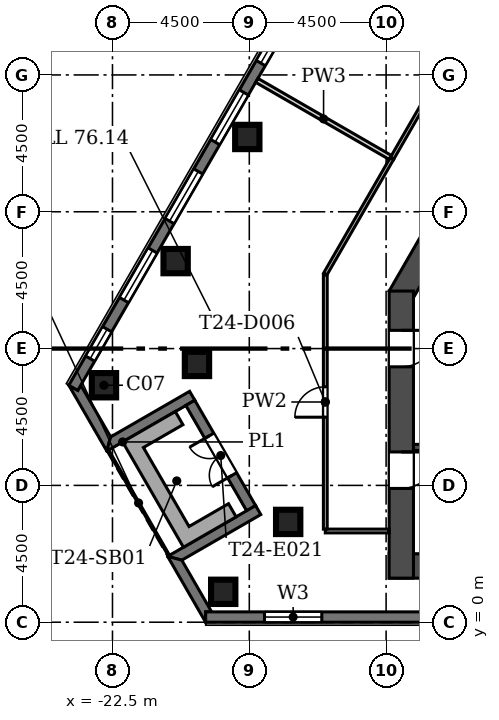
"""IFC4 building model, lengths in metres.
Left out: names, types, materials, properties, quantities, classifications, styles, units other than length and angle.
Written with IfcOpenShell. Run it as: python <this file> out.ifc"""

import sys

from ifc_helpers import new_model, si_unit, direction, frame, frame_2d, origin, origin_2d, place, context, subcontext, project, spatial, polyline, rectangle, outline, extrude, element, fill, save


model = new_model("IFC4")
c1 = context("Model", 3, precision=1e-05, world=origin(), true_north=direction((0.0, 1.0)))
c2 = subcontext(c1, "Body", "Model", "MODEL_VIEW")
j1 = project(units=[si_unit("LENGTHUNIT", "METRE"), si_unit("PLANEANGLEUNIT", "RADIAN")], contexts=[c1])
p1 = place(None, origin())
s1 = spatial("IfcSite", under=j1, at=p1, CompositionType="ELEMENT")
p2 = place(p1, origin())
s2 = spatial("IfcBuilding", under=s1, at=p2, CompositionType="ELEMENT")
p3 = place(p2, frame((0.0, 0.0, 335.1)))
s3 = spatial("IfcBuildingStorey", under=s2, at=p3, CompositionType="ELEMENT", Elevation=335.1)
for number, where, z_axis, x_axis in (
    (1, (-22.78, 7.794, 0.0), (0.0, 0.0, 1.0), (1.0, 0.0, 0.0)),
    (2, (-19.721, 8.495, 0.0), (0.0, 0.0, 1.0), (1.0, 0.0, 0.0)),
    (3, (-16.721, 3.299, 0.0), (0.0, 0.0, 1.0), (1.0, 0.0, 0.0)),
    (4, (-18.858, 1.0, 0.0), (0.0, 0.0, 1.0), (1.0, 0.0, 0.0)),
    (5, (-18.066, 15.96, 0.0), (0.0, 0.0, 1.0), (1.0, 0.0, 0.0)),
    (6, (-20.423, 11.877, 0.0), (0.0, 0.0, 1.0), (1.0, 0.0, 0.0)),
):
    element("IfcColumn", number, at=place(p3, frame(where, z_axis=z_axis, x_axis=x_axis)), inside=s3, PredefinedType="COLUMN", context=c2, shape_type="SweptSolid", body=[
        extrude(rectangle(XDim=0.8, YDim=0.8, at=origin_2d()), origin(), (0.0, 0.0, 1.0), 4.2),
    ])
p4 = place(p3, frame((-13.4, 1.85, 0.0), z_axis=(0.0, 0.0, 1.0), x_axis=(1.0, 0.0, 0.0)))
e7 = element("IfcWall", 7, at=p4, inside=s3, PredefinedType="SHEAR", context=c2, shape_type="SweptSolid", body=[
    extrude(rectangle(XDim=26.8, YDim=0.8, at=frame_2d((13.4, 0.0))), origin(), (0.0, 0.0, 1.0), 4.2),
])
p5 = place(p3, frame((-8.719, 18.2, 0.0), z_axis=(0.0, 0.0, 1.0), x_axis=(-0.500015780397, -0.866016292776, 0.0)))
e8 = element("IfcWall", 8, at=p5, inside=s3, PredefinedType="SHEAR", context=c2, shape_type="SweptSolid", body=[
    extrude(rectangle(XDim=8.67, YDim=0.8, at=frame_2d((4.335, 0.0))), origin(), (0.0, 0.0, 1.0), 4.2),
])
p6 = place(p3, frame((-13.0, 10.892, 0.0), z_axis=(0.0, 0.0, 1.0), x_axis=(0.0, -1.0, 0.0)))
e9 = element("IfcWall", 9, at=p6, inside=s3, PredefinedType="SHEAR", context=c2, shape_type="SweptSolid", body=[
    extrude(rectangle(XDim=9.442, YDim=0.8, at=frame_2d((4.721, 0.0))), origin(), (0.0, 0.0, 1.0), 4.2),
])
p7 = place(p6, frame((5.292, 0.0, 0.0)))
e10 = element("IfcOpeningElement", 10, at=p7, cuts=e9, PredefinedType="OPENING", context=c2, shape_type="SweptSolid", body=[
    extrude(rectangle(XDim=1.2, YDim=2.1, at=frame_2d((0.6, 1.05))), frame((0.0, 0.41, 0.0), z_axis=(0.0, -1.0, 0.0), x_axis=(1.0, 0.0, 0.0)), (0.0, 0.0, 1.0), 0.82),
])
p8 = place(p6, frame((1.292, 0.0, 0.0)))
e11 = element("IfcOpeningElement", 11, at=p8, cuts=e9, PredefinedType="OPENING", context=c2, shape_type="SweptSolid", body=[
    extrude(rectangle(XDim=1.2, YDim=2.1, at=frame_2d((0.6, 1.05))), frame((0.0, 0.41, 0.0), z_axis=(0.0, -1.0, 0.0), x_axis=(1.0, 0.0, 0.0)), (0.0, 0.0, 1.0), 0.82),
])
p9 = place(p3, origin())
e12 = element("IfcWall", 12, at=p9, inside=s3, PredefinedType="SOLIDWALL", context=c2, shape_type="SweptSolid", body=[
    extrude(outline(polyline([(-22.685, 5.628), (-23.936, 7.795), (-23.936, 7.795), (-23.641, 7.625), (-23.542, 7.795), (-22.56, 6.094), (-22.685, 5.628), (-22.685, 5.628)])), origin(), (0.0, 0.0, 1.0), 3.8),
])
p10 = place(p3, origin())
e13 = element("IfcWall", 13, at=p10, inside=s3, PredefinedType="SOLIDWALL", context=c2, shape_type="SweptSolid", body=[
    extrude(outline(polyline([(-19.962, 7.594), (-19.792, 7.299), (-20.087, 7.129), (-22.686, 5.628), (-22.686, 5.628), (-22.561, 6.094), (-19.962, 7.594)])), origin(), (0.0, 0.0, 1.0), 3.8),
])
p11 = place(p3, frame((-19.94, 7.214, 0.0), z_axis=(0.0, 0.0, 1.0), x_axis=(0.49999894854, -0.866026010844, 0.0)))
e14 = element("IfcWall", 14, at=p11, inside=s3, PredefinedType="SOLIDWALL", context=c2, shape_type="SweptSolid", body=[
    extrude(rectangle(XDim=4.0, YDim=0.34, at=frame_2d((2.0, 0.0))), origin(), (0.0, 0.0, 1.0), 3.8),
])
p12 = place(p11, frame((1.25, 0.0, 0.0)))
e15 = element("IfcOpeningElement", 15, at=p12, cuts=e14, PredefinedType="OPENING", context=c2, shape_type="SweptSolid", body=[
    extrude(rectangle(XDim=1.5, YDim=2.4, at=frame_2d((0.75, 1.2))), frame((0.0, 0.18, 0.0), z_axis=(0.0, -1.0, 0.0), x_axis=(1.0, 0.0, 0.0)), (0.0, 0.0, 1.0), 0.36),
])
p13 = place(p3, origin())
e16 = element("IfcWall", 16, at=p13, inside=s3, PredefinedType="SOLIDWALL", context=c2, shape_type="SweptSolid", body=[
    extrude(outline(polyline([(-20.686, 2.165), (-18.087, 3.666), (-17.792, 3.836), (-17.622, 3.54), (-20.22, 2.04), (-20.686, 2.165), (-20.686, 2.165)])), origin(), (0.0, 0.0, 1.0), 3.8),
])
p14 = place(p3, origin())
e17 = element("IfcWall", 17, at=p14, inside=s3, PredefinedType="SOLIDWALL", context=c2, shape_type="SweptSolid", body=[
    extrude(outline(polyline([(-19.238, 0.339), (-19.434, 0.339), (-19.434, -0.001), (-19.435, -0.001), (-20.686, 2.166), (-20.686, 2.166), (-20.22, 2.041), (-19.238, 0.339)])), origin(), (0.0, 0.0, 1.0), 3.8),
])
p15 = place(p3, frame((-19.435, 0.17, 0.0), z_axis=(0.0, 0.0, 1.0), x_axis=(1.0, 0.0, 0.0)))
e18 = element("IfcWall", 18, at=p15, inside=s3, PredefinedType="SOLIDWALL", context=c2, shape_type="SweptSolid", body=[
    extrude(rectangle(XDim=38.87, YDim=0.34, at=frame_2d((19.435, 0.0))), origin(), (0.0, 0.0, 1.0), 3.8),
])
p16 = place(p15, frame((1.935, 0.0, 0.9)))
e19 = element("IfcOpeningElement", 19, at=p16, cuts=e18, PredefinedType="OPENING", context=c2, shape_type="SweptSolid", body=[
    extrude(rectangle(XDim=1.885, YDim=2.6, at=frame_2d((0.942, 1.3))), frame((0.0, 0.18, 0.0), z_axis=(0.0, -1.0, 0.0), x_axis=(1.0, 0.0, 0.0)), (0.0, 0.0, 1.0), 0.36),
])
p17 = place(p15, frame((34.935, 0.0, 0.9)))
e20 = element("IfcOpeningElement", 20, at=p17, cuts=e18, PredefinedType="OPENING", context=c2, shape_type="SweptSolid", body=[
    extrude(rectangle(XDim=1.885, YDim=2.6, at=frame_2d((0.942, 1.3))), frame((0.0, 0.18, 0.0), z_axis=(0.0, -1.0, 0.0), x_axis=(1.0, 0.0, 0.0)), (0.0, 0.0, 1.0), 0.36),
])
p18 = place(p15, frame((11.735, 0.0, 0.6)))
e21 = element("IfcOpeningElement", 21, at=p18, cuts=e18, PredefinedType="OPENING", context=c2, shape_type="SweptSolid", body=[
    extrude(rectangle(XDim=0.6, YDim=3.0, at=frame_2d((0.3, 1.5))), frame((0.0, 0.18, 0.0), z_axis=(0.0, -1.0, 0.0), x_axis=(1.0, 0.0, 0.0)), (0.0, 0.0, 1.0), 0.36),
])
p19 = place(p15, frame((26.535, 0.0, 0.6)))
e22 = element("IfcOpeningElement", 22, at=p19, cuts=e18, PredefinedType="OPENING", context=c2, shape_type="SweptSolid", body=[
    extrude(rectangle(XDim=0.6, YDim=3.0, at=frame_2d((0.3, 1.5))), frame((0.0, 0.18, 0.0), z_axis=(0.0, -1.0, 0.0), x_axis=(1.0, 0.0, 0.0)), (0.0, 0.0, 1.0), 0.36),
])
p20 = place(p3, frame((-4.353, 41.372, 0.0), z_axis=(0.0, 0.0, 1.0), x_axis=(-0.500001731347, -0.866024404189, 0.0)))
e23 = element("IfcWall", 23, at=p20, inside=s3, PredefinedType="SOLIDWALL", context=c2, shape_type="SweptSolid", body=[
    extrude(rectangle(XDim=38.87, YDim=0.34, at=frame_2d((19.435, 0.0))), origin(), (0.0, 0.0, 1.0), 3.8),
])
p21 = place(p20, frame((3.653, 0.0, 0.9)))
e24 = element("IfcOpeningElement", 24, at=p21, cuts=e23, PredefinedType="OPENING", context=c2, shape_type="SweptSolid", body=[
    extrude(rectangle(XDim=1.885, YDim=2.6, at=frame_2d((0.942, 1.3))), frame((0.0, 0.18, 0.0), z_axis=(0.0, -1.0, 0.0), x_axis=(1.0, 0.0, 0.0)), (0.0, 0.0, 1.0), 0.36),
])
p22 = place(p20, frame((6.653, 0.0, 0.9)))
e25 = element("IfcOpeningElement", 25, at=p22, cuts=e23, PredefinedType="OPENING", context=c2, shape_type="SweptSolid", body=[
    extrude(rectangle(XDim=1.885, YDim=2.6, at=frame_2d((0.942, 1.3))), frame((0.0, 0.18, 0.0), z_axis=(0.0, -1.0, 0.0), x_axis=(1.0, 0.0, 0.0)), (0.0, 0.0, 1.0), 0.36),
])
p23 = place(p20, frame((9.653, 0.0, 0.9)))
e26 = element("IfcOpeningElement", 26, at=p23, cuts=e23, PredefinedType="OPENING", context=c2, shape_type="SweptSolid", body=[
    extrude(rectangle(XDim=1.885, YDim=2.6, at=frame_2d((0.942, 1.3))), frame((0.0, 0.18, 0.0), z_axis=(0.0, -1.0, 0.0), x_axis=(1.0, 0.0, 0.0)), (0.0, 0.0, 1.0), 0.36),
])
p24 = place(p20, frame((12.653, 0.0, 0.9)))
e27 = element("IfcOpeningElement", 27, at=p24, cuts=e23, PredefinedType="OPENING", context=c2, shape_type="SweptSolid", body=[
    extrude(rectangle(XDim=1.885, YDim=2.6, at=frame_2d((0.942, 1.3))), frame((0.0, 0.18, 0.0), z_axis=(0.0, -1.0, 0.0), x_axis=(1.0, 0.0, 0.0)), (0.0, 0.0, 1.0), 0.36),
])
p25 = place(p20, frame((15.653, 0.0, 0.9)))
e28 = element("IfcOpeningElement", 28, at=p25, cuts=e23, PredefinedType="OPENING", context=c2, shape_type="SweptSolid", body=[
    extrude(rectangle(XDim=1.885, YDim=2.6, at=frame_2d((0.942, 1.3))), frame((0.0, 0.18, 0.0), z_axis=(0.0, -1.0, 0.0), x_axis=(1.0, 0.0, 0.0)), (0.0, 0.0, 1.0), 0.36),
])
p26 = place(p20, frame((18.653, 0.0, 0.9)))
e29 = element("IfcOpeningElement", 29, at=p26, cuts=e23, PredefinedType="OPENING", context=c2, shape_type="SweptSolid", body=[
    extrude(rectangle(XDim=1.885, YDim=2.6, at=frame_2d((0.942, 1.3))), frame((0.0, 0.18, 0.0), z_axis=(0.0, -1.0, 0.0), x_axis=(1.0, 0.0, 0.0)), (0.0, 0.0, 1.0), 0.36),
])
p27 = place(p20, frame((21.653, 0.0, 0.9)))
e30 = element("IfcOpeningElement", 30, at=p27, cuts=e23, PredefinedType="OPENING", context=c2, shape_type="SweptSolid", body=[
    extrude(rectangle(XDim=1.885, YDim=2.6, at=frame_2d((0.942, 1.3))), frame((0.0, 0.18, 0.0), z_axis=(0.0, -1.0, 0.0), x_axis=(1.0, 0.0, 0.0)), (0.0, 0.0, 1.0), 0.36),
])
p28 = place(p20, frame((24.653, 0.0, 0.9)))
e31 = element("IfcOpeningElement", 31, at=p28, cuts=e23, PredefinedType="OPENING", context=c2, shape_type="SweptSolid", body=[
    extrude(rectangle(XDim=1.885, YDim=2.6, at=frame_2d((0.942, 1.3))), frame((0.0, 0.18, 0.0), z_axis=(0.0, -1.0, 0.0), x_axis=(1.0, 0.0, 0.0)), (0.0, 0.0, 1.0), 0.36),
])
p29 = place(p20, frame((27.653, 0.0, 0.9)))
e32 = element("IfcOpeningElement", 32, at=p29, cuts=e23, PredefinedType="OPENING", context=c2, shape_type="SweptSolid", body=[
    extrude(rectangle(XDim=1.885, YDim=2.6, at=frame_2d((0.942, 1.3))), frame((0.0, 0.18, 0.0), z_axis=(0.0, -1.0, 0.0), x_axis=(1.0, 0.0, 0.0)), (0.0, 0.0, 1.0), 0.36),
])
p30 = place(p20, frame((30.653, 0.0, 0.9)))
e33 = element("IfcOpeningElement", 33, at=p30, cuts=e23, PredefinedType="OPENING", context=c2, shape_type="SweptSolid", body=[
    extrude(rectangle(XDim=1.885, YDim=2.6, at=frame_2d((0.942, 1.3))), frame((0.0, 0.18, 0.0), z_axis=(0.0, -1.0, 0.0), x_axis=(1.0, 0.0, 0.0)), (0.0, 0.0, 1.0), 0.36),
])
p31 = place(p20, frame((33.653, 0.0, 0.9)))
e34 = element("IfcOpeningElement", 34, at=p31, cuts=e23, PredefinedType="OPENING", context=c2, shape_type="SweptSolid", body=[
    extrude(rectangle(XDim=1.885, YDim=2.6, at=frame_2d((0.942, 1.3))), frame((0.0, 0.18, 0.0), z_axis=(0.0, -1.0, 0.0), x_axis=(1.0, 0.0, 0.0)), (0.0, 0.0, 1.0), 0.36),
])
p32 = place(p20, frame((1.269, 0.0, 0.9)))
e35 = element("IfcOpeningElement", 35, at=p32, cuts=e23, PredefinedType="OPENING", context=c2, shape_type="SweptSolid", body=[
    extrude(rectangle(XDim=1.115, YDim=2.4, at=frame_2d((0.558, 1.2))), frame((0.0, 0.18, 0.0), z_axis=(0.0, -1.0, 0.0), x_axis=(1.0, 0.0, 0.0)), (0.0, 0.0, 1.0), 0.36),
])
p33 = place(p20, frame((36.646, 0.0, 0.9)))
e36 = element("IfcOpeningElement", 36, at=p33, cuts=e23, PredefinedType="OPENING", context=c2, shape_type="SweptSolid", body=[
    extrude(rectangle(XDim=1.115, YDim=2.4, at=frame_2d((0.558, 1.2))), frame((0.0, 0.18, 0.0), z_axis=(0.0, -1.0, 0.0), x_axis=(1.0, 0.0, 0.0)), (0.0, 0.0, 1.0), 0.36),
])
p34 = place(p3, origin())
e37 = element("IfcWall", 37, at=p34, inside=s3, PredefinedType="USERDEFINED", context=c2, shape_type="SweptSolid", body=[
    extrude(outline(polyline([(-18.683, 3.898), (-19.982, 3.148), (-21.482, 5.746), (-20.183, 6.496), (-20.433, 6.929), (-22.165, 5.929), (-20.165, 2.465), (-19.732, 2.715), (-19.732, 2.715), (-18.433, 3.465), (-18.683, 3.898)])), origin(), (0.0, 0.0, 1.0), 1.1),
])
p35 = place(p3, frame((-12.6, 5.75, -0.4), z_axis=(0.0, 0.0, 1.0), x_axis=(1.0, 0.0, 0.0)))
e38 = element("IfcWall", 38, at=p35, inside=s3, PredefinedType="SOLIDWALL", context=c2, shape_type="SweptSolid", body=[
    extrude(rectangle(XDim=11.4, YDim=0.2, at=frame_2d((5.7, 0.0))), origin(), (0.0, 0.0, 1.0), 4.2),
])
p36 = place(p3, frame((-13.306, 15.254, 0.0), z_axis=(0.0, 0.0, 1.0), x_axis=(0.499984357326, 0.866034434898, 0.0)))
e39 = element("IfcWall", 39, at=p36, inside=s3, PredefinedType="PARTITIONING", context=c2, shape_type="SweptSolid", body=[
    extrude(rectangle(XDim=3.523, YDim=0.125, at=frame_2d((1.762, 0.0))), origin(), (0.0, 0.0, 1.0), 3.8),
])
p37 = place(p3, frame((-13.4, 3.0, 0.0), z_axis=(0.0, 0.0, 1.0), x_axis=(-1.0, 0.0, 0.0)))
e40 = element("IfcWall", 40, at=p37, inside=s3, PredefinedType="PARTITIONING", context=c2, shape_type="SweptSolid", body=[
    extrude(rectangle(XDim=2.1, YDim=0.125, at=frame_2d((1.05, 0.0))), origin(), (0.0, 0.0, 1.0), 3.8),
])
p38 = place(p3, frame((-15.5, 3.062, 0.0), z_axis=(0.0, 0.0, 1.0), x_axis=(0.0, 1.0, 0.0)))
e41 = element("IfcWall", 41, at=p38, inside=s3, PredefinedType="PARTITIONING", context=c2, shape_type="SweptSolid", body=[
    extrude(rectangle(XDim=8.361, YDim=0.125, at=frame_2d((4.181, 0.0))), origin(), (0.0, 0.0, 1.0), 3.8),
])
p39 = place(p38, frame((3.68, 0.0, 0.0)))
e42 = element("IfcOpeningElement", 42, at=p39, cuts=e41, PredefinedType="OPENING", context=c2, shape_type="SweptSolid", body=[
    extrude(rectangle(XDim=1.0, YDim=2.1, at=frame_2d((0.5, 1.05))), frame((0.0, 0.073, 0.0), z_axis=(0.0, -1.0, 0.0), x_axis=(1.0, 0.0, 0.0)), (0.0, 0.0, 1.0), 0.145),
])
p40 = place(p3, frame((-15.5, 11.455, 0.0), z_axis=(0.0, 0.0, 1.0), x_axis=(0.500005024956, 0.866022502605, 0.0)))
e43 = element("IfcWall", 43, at=p40, inside=s3, PredefinedType="PARTITIONING", context=c2, shape_type="SweptSolid", body=[
    extrude(rectangle(XDim=4.388, YDim=0.125, at=frame_2d((2.194, 0.0))), origin(), (0.0, 0.0, 1.0), 3.8),
])
p41 = place(p3, frame((-13.36, 15.285, 0.0), z_axis=(0.0, 0.0, 1.0), x_axis=(-0.86601005171, 0.50002658963, 0.0)))
e44 = element("IfcWall", 44, at=p41, inside=s3, PredefinedType="PARTITIONING", context=c2, shape_type="SweptSolid", body=[
    extrude(rectangle(XDim=5.073, YDim=0.15, at=frame_2d((2.536, 0.0))), origin(), (0.0, 0.0, 1.0), 3.8),
])
p42 = place(p12, frame((1.5, 0.0, 0.0), z_axis=(0.0, 0.0, 1.0), x_axis=(-1.0, 0.0, 0.0)))
e45 = element("IfcDoor", 45, at=p42, inside=s3, OperationType="DOUBLE_DOOR_SINGLE_SWING", PredefinedType="DOOR", context=c2, shape_type="SweptSolid", body=[
    extrude(rectangle(XDim=1.5, YDim=2.4, at=frame_2d((0.75, 1.2))), frame((0.0, 0.025, 0.0), z_axis=(0.0, -1.0, 0.0), x_axis=(1.0, 0.0, 0.0)), (0.0, 0.0, 1.0), 0.05),
])
fill(e15, e45)
p43 = place(p16, origin())
e46 = element("IfcWindow", 46, at=p43, inside=s3, PartitioningType="SINGLE_PANEL", PredefinedType="WINDOW", context=c2, shape_type="SweptSolid", body=[
    extrude(rectangle(XDim=1.885, YDim=2.6, at=frame_2d((0.942, 1.3))), frame((0.0, 0.11, 0.0), z_axis=(0.0, -1.0, 0.0), x_axis=(1.0, 0.0, 0.0)), (0.0, 0.0, 1.0), 0.06),
])
fill(e19, e46)
p44 = place(p28, origin())
e47 = element("IfcWindow", 47, at=p44, inside=s3, PartitioningType="SINGLE_PANEL", PredefinedType="WINDOW", context=c2, shape_type="SweptSolid", body=[
    extrude(rectangle(XDim=1.885, YDim=2.6, at=frame_2d((0.942, 1.3))), frame((0.0, 0.11, 0.0), z_axis=(0.0, -1.0, 0.0), x_axis=(1.0, 0.0, 0.0)), (0.0, 0.0, 1.0), 0.06),
])
fill(e31, e47)
p45 = place(p29, origin())
e48 = element("IfcWindow", 48, at=p45, inside=s3, PartitioningType="SINGLE_PANEL", PredefinedType="WINDOW", context=c2, shape_type="SweptSolid", body=[
    extrude(rectangle(XDim=1.885, YDim=2.6, at=frame_2d((0.942, 1.3))), frame((0.0, 0.11, 0.0), z_axis=(0.0, -1.0, 0.0), x_axis=(1.0, 0.0, 0.0)), (0.0, 0.0, 1.0), 0.06),
])
fill(e32, e48)
p46 = place(p30, origin())
e49 = element("IfcWindow", 49, at=p46, inside=s3, PartitioningType="SINGLE_PANEL", PredefinedType="WINDOW", context=c2, shape_type="SweptSolid", body=[
    extrude(rectangle(XDim=1.885, YDim=2.6, at=frame_2d((0.942, 1.3))), frame((0.0, 0.11, 0.0), z_axis=(0.0, -1.0, 0.0), x_axis=(1.0, 0.0, 0.0)), (0.0, 0.0, 1.0), 0.06),
])
fill(e33, e49)
p47 = place(p31, origin())
e50 = element("IfcWindow", 50, at=p47, inside=s3, PartitioningType="SINGLE_PANEL", PredefinedType="WINDOW", context=c2, shape_type="SweptSolid", body=[
    extrude(rectangle(XDim=1.885, YDim=2.6, at=frame_2d((0.942, 1.3))), frame((0.0, 0.11, 0.0), z_axis=(0.0, -1.0, 0.0), x_axis=(1.0, 0.0, 0.0)), (0.0, 0.0, 1.0), 0.06),
])
fill(e34, e50)
p48 = place(p33, origin())
e51 = element("IfcWindow", 51, at=p48, inside=s3, PartitioningType="SINGLE_PANEL", PredefinedType="WINDOW", context=c2, shape_type="SweptSolid", body=[
    extrude(rectangle(XDim=1.115, YDim=2.4, at=frame_2d((0.558, 1.2))), frame((0.0, 0.11, 0.0), z_axis=(0.0, -1.0, 0.0), x_axis=(1.0, 0.0, 0.0)), (0.0, 0.0, 1.0), 0.06),
])
fill(e36, e51)
p49 = place(p7, origin())
e52 = element("IfcDoor", 52, at=p49, inside=s3, OperationType="SINGLE_SWING_LEFT", PredefinedType="DOOR", context=c2, shape_type="SweptSolid", body=[
    extrude(rectangle(XDim=1.2, YDim=2.1, at=frame_2d((0.6, 1.05))), frame((0.0, 0.025, 0.0), z_axis=(0.0, -1.0, 0.0), x_axis=(1.0, 0.0, 0.0)), (0.0, 0.0, 1.0), 0.05),
])
fill(e10, e52)
p50 = place(p8, origin())
e53 = element("IfcDoor", 53, at=p50, inside=s3, OperationType="SINGLE_SWING_LEFT", PredefinedType="DOOR", context=c2, shape_type="SweptSolid", body=[
    extrude(rectangle(XDim=1.2, YDim=2.1, at=frame_2d((0.6, 1.05))), frame((0.0, 0.025, 0.0), z_axis=(0.0, -1.0, 0.0), x_axis=(1.0, 0.0, 0.0)), (0.0, 0.0, 1.0), 0.05),
])
fill(e11, e53)
p51 = place(p39, origin())
e54 = element("IfcDoor", 54, at=p51, inside=s3, OperationType="SINGLE_SWING_LEFT", PredefinedType="DOOR", context=c2, shape_type="SweptSolid", body=[
    extrude(rectangle(XDim=1.0, YDim=2.1, at=frame_2d((0.5, 1.05))), frame((0.0, 0.025, 0.0), z_axis=(0.0, -1.0, 0.0), x_axis=(1.0, 0.0, 0.0)), (0.0, 0.0, 1.0), 0.05),
])
fill(e42, e54)
save(model, sys.argv[1])
